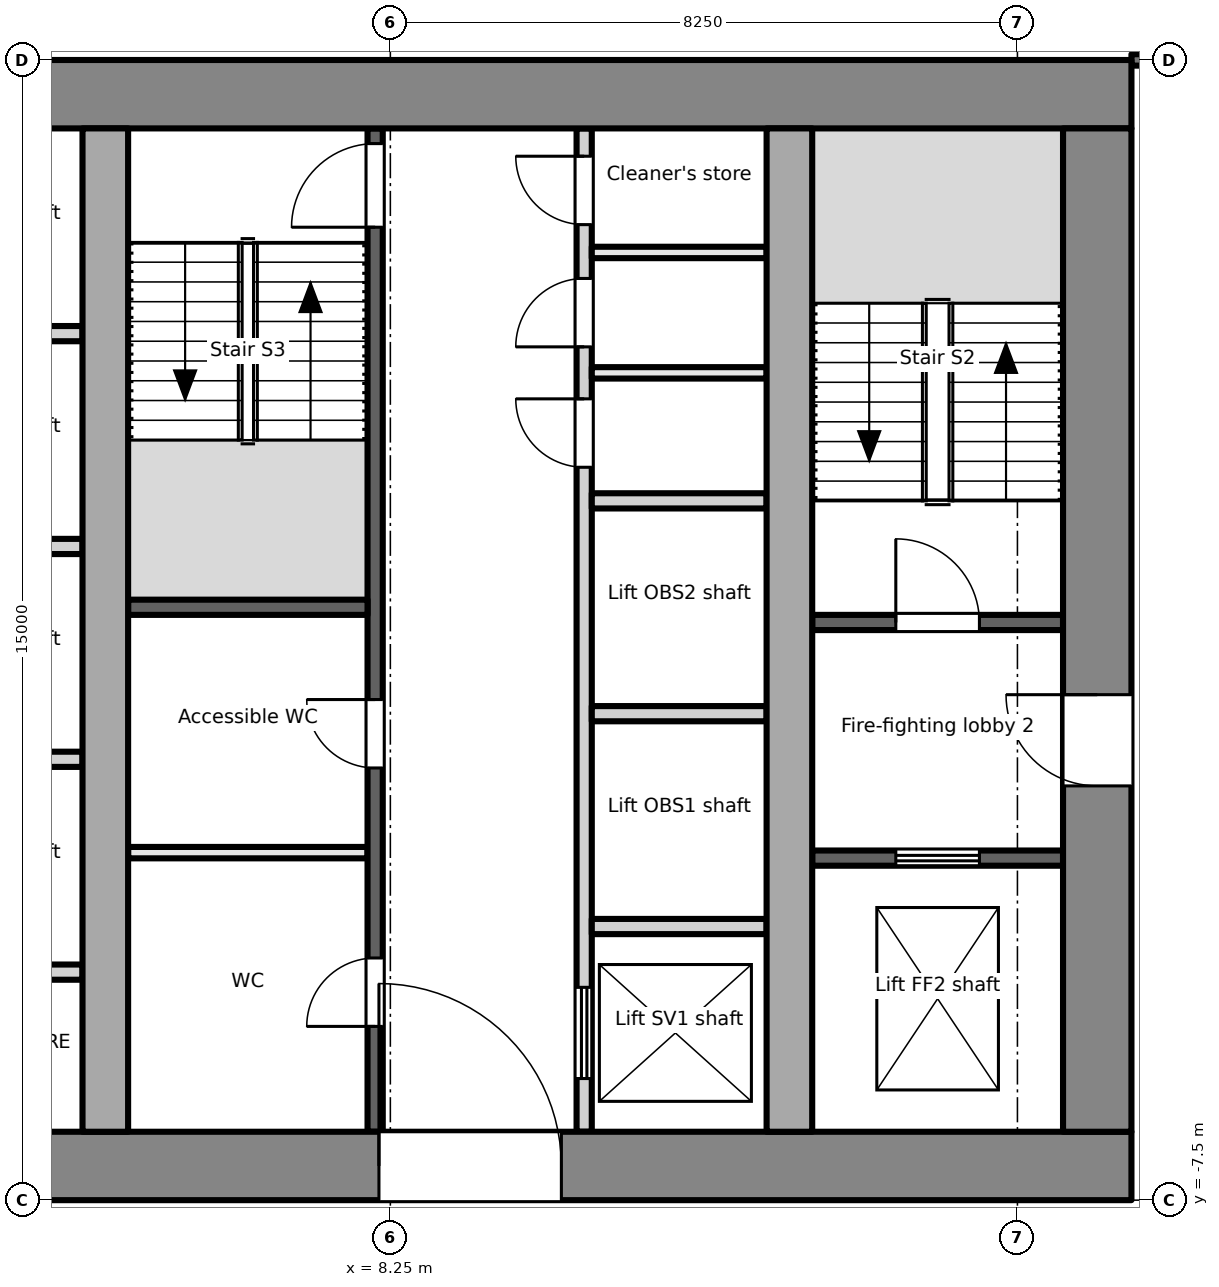
"""IFC4 building model, lengths in metres.
Left out: names, types, materials, properties, quantities, classifications, styles, units other than length and angle.
Written with IfcOpenShell. Run it as: python <this file> out.ifc"""

import sys

from ifc_helpers import new_model, si_unit, direction, frame, frame_2d, origin, place, context, subcontext, project, spatial, rectangle, extrude, element, fill, save


model = new_model("IFC4")
c1 = context("Model", 3, precision=1e-05, world=origin(), true_north=direction((0.0, 1.0)))
c2 = subcontext(c1, "Body", "Model", "MODEL_VIEW")
j1 = project(units=[si_unit("LENGTHUNIT", "METRE"), si_unit("PLANEANGLEUNIT", "RADIAN")], contexts=[c1])
p1 = place(None, origin())
s1 = spatial("IfcSite", under=j1, at=p1, CompositionType="ELEMENT")
p2 = place(p1, origin())
s2 = spatial("IfcBuilding", under=s1, at=p2, CompositionType="ELEMENT")
p3 = place(p2, frame((0.0, 0.0, 154.1)))
s3 = spatial("IfcBuildingStorey", under=s2, at=p3, CompositionType="ELEMENT", Elevation=154.1)
p4 = place(p3, frame((-18.0, -7.05, -0.2), z_axis=(0.0, 0.0, 1.0), x_axis=(1.0, 0.0, 0.0)))
e1 = element("IfcWall", 1, at=p4, inside=s3, PredefinedType="SHEAR", context=c2, shape_type="SweptSolid", body=[
    extrude(rectangle(XDim=36.0, YDim=0.9, at=frame_2d((18.0, 0.0))), origin(), (0.0, 0.0, 1.0), 4.0),
])
p5 = place(p4, frame((7.8, 0.0, 0.2)))
e2 = element("IfcOpeningElement", 2, at=p5, cuts=e1, PredefinedType="OPENING", context=c2, shape_type="SweptSolid", body=[
    extrude(rectangle(XDim=2.4, YDim=2.1, at=frame_2d((1.2, 1.05))), frame((0.0, 0.46, 0.0), z_axis=(0.0, -1.0, 0.0), x_axis=(1.0, 0.0, 0.0)), (0.0, 0.0, 1.0), 0.921),
])
p6 = place(p4, frame((17.4, 0.0, 0.2)))
e3 = element("IfcOpeningElement", 3, at=p6, cuts=e1, PredefinedType="OPENING", context=c2, shape_type="SweptSolid", body=[
    extrude(rectangle(XDim=1.2, YDim=2.1, at=frame_2d((0.6, 1.05))), frame((0.0, 0.46, 0.0), z_axis=(0.0, -1.0, 0.0), x_axis=(1.0, 0.0, 0.0)), (0.0, 0.0, 1.0), 0.921),
])
p7 = place(p4, frame((26.1, 0.0, 0.2)))
e4 = element("IfcOpeningElement", 4, at=p7, cuts=e1, PredefinedType="OPENING", context=c2, shape_type="SweptSolid", body=[
    extrude(rectangle(XDim=2.4, YDim=2.1, at=frame_2d((1.2, 1.05))), frame((0.0, 0.46, 0.0), z_axis=(0.0, -1.0, 0.0), x_axis=(1.0, 0.0, 0.0)), (0.0, 0.0, 1.0), 0.921),
])
p8 = place(p3, frame((-18.0, 7.05, -0.2), z_axis=(0.0, 0.0, 1.0), x_axis=(1.0, 0.0, 0.0)))
e5 = element("IfcWall", 5, at=p8, inside=s3, PredefinedType="SHEAR", context=c2, shape_type="SweptSolid", body=[
    extrude(rectangle(XDim=36.0, YDim=0.9, at=frame_2d((18.0, 0.0))), origin(), (0.0, 0.0, 1.0), 4.0),
])
p9 = place(p3, frame((17.55, -6.6, -0.2), z_axis=(0.0, 0.0, 1.0), x_axis=(0.0, 1.0, 0.0)))
e6 = element("IfcWall", 6, at=p9, inside=s3, PredefinedType="SHEAR", context=c2, shape_type="SweptSolid", body=[
    extrude(rectangle(XDim=13.2, YDim=0.9, at=frame_2d((6.6, 0.0))), origin(), (0.0, 0.0, 1.0), 4.0),
])
p10 = place(p9, frame((4.55, 0.0, 0.2)))
e7 = element("IfcOpeningElement", 7, at=p10, cuts=e6, PredefinedType="OPENING", context=c2, shape_type="SweptSolid", body=[
    extrude(rectangle(XDim=1.2, YDim=2.1, at=frame_2d((0.6, 1.05))), frame((0.0, 0.46, 0.0), z_axis=(0.0, -1.0, 0.0), x_axis=(1.0, 0.0, 0.0)), (0.0, 0.0, 1.0), 0.921),
])
for number, where, z_axis, x_axis in (
    (8, (4.5, -6.6, -0.2), (0.0, 0.0, 1.0), (0.0, 1.0, 0.0)),
    (9, (13.5, -6.6, -0.2), (0.0, 0.0, 1.0), (0.0, 1.0, 0.0)),
):
    element("IfcWall", number, at=place(p3, frame(where, z_axis=z_axis, x_axis=x_axis)), inside=s3, PredefinedType="SHEAR", context=c2, shape_type="SweptSolid", body=[
        extrude(rectangle(XDim=13.2, YDim=0.6, at=frame_2d((6.6, 0.0))), origin(), (0.0, 0.0, 1.0), 4.0),
    ])
p11 = place(p3, frame((13.8, -3.0, 0.0), z_axis=(0.0, 0.0, 1.0), x_axis=(1.0, 0.0, 0.0)))
e10 = element("IfcWall", 10, at=p11, inside=s3, PredefinedType="PARTITIONING", context=c2, shape_type="SweptSolid", body=[
    extrude(rectangle(XDim=3.3, YDim=0.2, at=frame_2d((1.65, 0.0))), origin(), (0.0, 0.0, 1.0), 3.8),
])
p12 = place(p11, frame((1.1, 0.0, 0.0)))
e11 = element("IfcOpeningElement", 11, at=p12, cuts=e10, PredefinedType="OPENING", context=c2, shape_type="SweptSolid", body=[
    extrude(rectangle(XDim=1.1, YDim=2.1, at=frame_2d((0.55, 1.05))), frame((0.0, 0.111, 0.0), z_axis=(0.0, -1.0, 0.0), x_axis=(1.0, 0.0, 0.0)), (0.0, 0.0, 1.0), 0.221),
])
p13 = place(p3, frame((13.8, 0.1, 0.0), z_axis=(0.0, 0.0, 1.0), x_axis=(1.0, 0.0, 0.0)))
e12 = element("IfcWall", 12, at=p13, inside=s3, PredefinedType="PARTITIONING", context=c2, shape_type="SweptSolid", body=[
    extrude(rectangle(XDim=3.3, YDim=0.2, at=frame_2d((1.65, 0.0))), origin(), (0.0, 0.0, 1.0), 3.8),
])
p14 = place(p13, frame((1.1, 0.0, 0.0)))
e13 = element("IfcOpeningElement", 13, at=p14, cuts=e12, PredefinedType="OPENING", context=c2, shape_type="SweptSolid", body=[
    extrude(rectangle(XDim=1.1, YDim=2.1, at=frame_2d((0.55, 1.05))), frame((0.0, 0.111, 0.0), z_axis=(0.0, -1.0, 0.0), x_axis=(1.0, 0.0, 0.0)), (0.0, 0.0, 1.0), 0.221),
])
for number, where, z_axis, x_axis in (
    (14, (1.9, -1.7, 0.0), (0.0, 0.0, 1.0), (1.0, 0.0, 0.0)),
    (15, (1.9, 1.1, 0.0), (0.0, 0.0, 1.0), (1.0, 0.0, 0.0)),
    (16, (1.9, 3.9, 0.0), (0.0, 0.0, 1.0), (1.0, 0.0, 0.0)),
    (17, (1.9, -4.5, 0.0), (0.0, 0.0, 1.0), (1.0, 0.0, 0.0)),
):
    element("IfcWall", number, at=place(p3, frame(where, z_axis=z_axis, x_axis=x_axis)), inside=s3, PredefinedType="PARTITIONING", context=c2, shape_type="SweptSolid", body=[
        extrude(rectangle(XDim=2.3, YDim=0.2, at=frame_2d((1.15, 0.0))), origin(), (0.0, 0.0, 1.0), 3.8),
    ])
p15 = place(p3, frame((8.05, -6.6, 0.0), z_axis=(0.0, 0.0, 1.0), x_axis=(0.0, 1.0, 0.0)))
e18 = element("IfcWall", 18, at=p15, inside=s3, PredefinedType="PARTITIONING", context=c2, shape_type="SweptSolid", body=[
    extrude(rectangle(XDim=13.2, YDim=0.2, at=frame_2d((6.6, 0.0))), origin(), (0.0, 0.0, 1.0), 3.8),
])
p16 = place(p15, frame((1.386, 0.0, 0.0)))
e19 = element("IfcOpeningElement", 19, at=p16, cuts=e18, PredefinedType="OPENING", context=c2, shape_type="SweptSolid", body=[
    extrude(rectangle(XDim=0.9, YDim=2.1, at=frame_2d((0.45, 1.05))), frame((0.0, 0.111, 0.0), z_axis=(0.0, -1.0, 0.0), x_axis=(1.0, 0.0, 0.0)), (0.0, 0.0, 1.0), 0.221),
])
p17 = place(p15, frame((4.786, 0.0, 0.0)))
e20 = element("IfcOpeningElement", 20, at=p17, cuts=e18, PredefinedType="OPENING", context=c2, shape_type="SweptSolid", body=[
    extrude(rectangle(XDim=0.9, YDim=2.1, at=frame_2d((0.45, 1.05))), frame((0.0, 0.111, 0.0), z_axis=(0.0, -1.0, 0.0), x_axis=(1.0, 0.0, 0.0)), (0.0, 0.0, 1.0), 0.221),
])
p18 = place(p15, frame((11.9, 0.0, 0.0)))
e21 = element("IfcOpeningElement", 21, at=p18, cuts=e18, PredefinedType="OPENING", context=c2, shape_type="SweptSolid", body=[
    extrude(rectangle(XDim=1.1, YDim=2.1, at=frame_2d((0.55, 1.05))), frame((0.0, 0.111, 0.0), z_axis=(0.0, -1.0, 0.0), x_axis=(1.0, 0.0, 0.0)), (0.0, 0.0, 1.0), 0.221),
])
p19 = place(p3, frame((10.8, -6.6, 0.0), z_axis=(0.0, 0.0, 1.0), x_axis=(0.0, 1.0, 0.0)))
e22 = element("IfcWall", 22, at=p19, inside=s3, PredefinedType="PARTITIONING", context=c2, shape_type="SweptSolid", body=[
    extrude(rectangle(XDim=13.2, YDim=0.2, at=frame_2d((6.6, 0.0))), origin(), (0.0, 0.0, 1.0), 3.8),
])
p20 = place(p19, frame((0.7, 0.0, 0.0)))
e23 = element("IfcOpeningElement", 23, at=p20, cuts=e22, PredefinedType="OPENING", context=c2, shape_type="SweptSolid", body=[
    extrude(rectangle(XDim=1.2, YDim=2.1, at=frame_2d((0.6, 1.05))), frame((0.0, 0.111, 0.0), z_axis=(0.0, -1.0, 0.0), x_axis=(1.0, 0.0, 0.0)), (0.0, 0.0, 1.0), 0.221),
])
p21 = place(p19, frame((8.742, 0.0, 0.0)))
e24 = element("IfcOpeningElement", 24, at=p21, cuts=e22, PredefinedType="OPENING", context=c2, shape_type="SweptSolid", body=[
    extrude(rectangle(XDim=0.9, YDim=2.1, at=frame_2d((0.45, 1.05))), frame((0.0, 0.111, 0.0), z_axis=(0.0, -1.0, 0.0), x_axis=(1.0, 0.0, 0.0)), (0.0, 0.0, 1.0), 0.221),
])
p22 = place(p19, frame((10.326, 0.0, 0.0)))
e25 = element("IfcOpeningElement", 25, at=p22, cuts=e22, PredefinedType="OPENING", context=c2, shape_type="SweptSolid", body=[
    extrude(rectangle(XDim=0.9, YDim=2.1, at=frame_2d((0.45, 1.05))), frame((0.0, 0.111, 0.0), z_axis=(0.0, -1.0, 0.0), x_axis=(1.0, 0.0, 0.0)), (0.0, 0.0, 1.0), 0.221),
])
p23 = place(p19, frame((11.934, 0.0, 0.0)))
e26 = element("IfcOpeningElement", 26, at=p23, cuts=e22, PredefinedType="OPENING", context=c2, shape_type="SweptSolid", body=[
    extrude(rectangle(XDim=0.9, YDim=2.1, at=frame_2d((0.45, 1.05))), frame((0.0, 0.111, 0.0), z_axis=(0.0, -1.0, 0.0), x_axis=(1.0, 0.0, 0.0)), (0.0, 0.0, 1.0), 0.221),
])
p24 = place(p3, frame((4.8, 0.3, 0.0), z_axis=(0.0, 0.0, 1.0), x_axis=(1.0, 0.0, 0.0)))
e27 = element("IfcWall", 27, at=p24, inside=s3, PredefinedType="PARTITIONING", context=c2, shape_type="SweptSolid", body=[
    extrude(rectangle(XDim=3.15, YDim=0.2, at=frame_2d((1.575, 0.0))), origin(), (0.0, 0.0, 1.0), 3.8),
])
p25 = place(p3, frame((4.8, -2.928, 0.0), z_axis=(0.0, 0.0, 1.0), x_axis=(1.0, 0.0, 0.0)))
e28 = element("IfcWall", 28, at=p25, inside=s3, PredefinedType="PARTITIONING", context=c2, shape_type="SweptSolid", body=[
    extrude(rectangle(XDim=3.15, YDim=0.15, at=frame_2d((1.575, 0.0))), origin(), (0.0, 0.0, 1.0), 3.8),
])
for number, where, z_axis, x_axis in (
    (29, (10.9, -3.9, 0.0), (0.0, 0.0, 1.0), (1.0, 0.0, 0.0)),
    (30, (10.9, -1.1, 0.0), (0.0, 0.0, 1.0), (1.0, 0.0, 0.0)),
    (31, (10.9, 1.7, 0.0), (0.0, 0.0, 1.0), (1.0, 0.0, 0.0)),
):
    element("IfcWall", number, at=place(p3, frame(where, z_axis=z_axis, x_axis=x_axis)), inside=s3, PredefinedType="PARTITIONING", context=c2, shape_type="SweptSolid", body=[
        extrude(rectangle(XDim=2.3, YDim=0.2, at=frame_2d((1.15, 0.0))), origin(), (0.0, 0.0, 1.0), 3.8),
    ])
for number, where, z_axis, x_axis in (
    (32, (10.9, 3.384, 0.0), (0.0, 0.0, 1.0), (1.0, 0.0, 0.0)),
    (33, (10.9, 4.968, 0.0), (0.0, 0.0, 1.0), (1.0, 0.0, 0.0)),
):
    element("IfcWall", number, at=place(p3, frame(where, z_axis=z_axis, x_axis=x_axis)), inside=s3, PredefinedType="PARTITIONING", context=c2, shape_type="SweptSolid", body=[
        extrude(rectangle(XDim=2.3, YDim=0.15, at=frame_2d((1.15, 0.0))), origin(), (0.0, 0.0, 1.0), 3.8),
    ])
p26 = place(p3, frame((18.0, 7.501, 0.0), z_axis=(0.0, 0.0, 1.0), x_axis=(1.0, 0.0, 0.0)))
e34 = element("IfcWall", 34, at=p26, inside=s3, PredefinedType="PARTITIONING", context=c2, shape_type="SweptSolid", body=[
    extrude(rectangle(XDim=2.325, YDim=0.15, at=frame_2d((1.163, 0.0))), origin(), (0.0, 0.0, 1.0), 3.8),
])
p27 = place(p12, origin())
e35 = element("IfcDoor", 35, at=p27, inside=s3, OperationType="DOUBLE_DOOR_SLIDING", PredefinedType="DOOR", context=c2, shape_type="SweptSolid", body=[
    extrude(rectangle(XDim=1.1, YDim=2.1, at=frame_2d((0.55, 1.05))), frame((0.0, 0.025, 0.0), z_axis=(0.0, -1.0, 0.0), x_axis=(1.0, 0.0, 0.0)), (0.0, 0.0, 1.0), 0.05),
])
fill(e11, e35)
p28 = place(p10, origin())
e36 = element("IfcDoor", 36, at=p28, inside=s3, OperationType="SINGLE_SWING_RIGHT", PredefinedType="DOOR", context=c2, shape_type="SweptSolid", body=[
    extrude(rectangle(XDim=1.2, YDim=2.1, at=frame_2d((0.6, 1.05))), frame((0.0, 0.025, 0.0), z_axis=(0.0, -1.0, 0.0), x_axis=(1.0, 0.0, 0.0)), (0.0, 0.0, 1.0), 0.05),
])
fill(e7, e36)
p29 = place(p14, origin())
e37 = element("IfcDoor", 37, at=p29, inside=s3, OperationType="SINGLE_SWING_LEFT", PredefinedType="DOOR", context=c2, shape_type="SweptSolid", body=[
    extrude(rectangle(XDim=1.1, YDim=2.1, at=frame_2d((0.55, 1.05))), frame((0.0, 0.025, 0.0), z_axis=(0.0, -1.0, 0.0), x_axis=(1.0, 0.0, 0.0)), (0.0, 0.0, 1.0), 0.05),
])
fill(e13, e37)
p30 = place(p16, origin())
e38 = element("IfcDoor", 38, at=p30, inside=s3, OperationType="SINGLE_SWING_LEFT", PredefinedType="DOOR", context=c2, shape_type="SweptSolid", body=[
    extrude(rectangle(XDim=0.9, YDim=2.1, at=frame_2d((0.45, 1.05))), frame((0.0, 0.025, 0.0), z_axis=(0.0, -1.0, 0.0), x_axis=(1.0, 0.0, 0.0)), (0.0, 0.0, 1.0), 0.05),
])
fill(e19, e38)
p31 = place(p17, origin())
e39 = element("IfcDoor", 39, at=p31, inside=s3, OperationType="SINGLE_SWING_RIGHT", PredefinedType="DOOR", context=c2, shape_type="SweptSolid", body=[
    extrude(rectangle(XDim=0.9, YDim=2.1, at=frame_2d((0.45, 1.05))), frame((0.0, 0.025, 0.0), z_axis=(0.0, -1.0, 0.0), x_axis=(1.0, 0.0, 0.0)), (0.0, 0.0, 1.0), 0.05),
])
fill(e20, e39)
p32 = place(p18, origin())
e40 = element("IfcDoor", 40, at=p32, inside=s3, OperationType="SINGLE_SWING_LEFT", PredefinedType="DOOR", context=c2, shape_type="SweptSolid", body=[
    extrude(rectangle(XDim=1.1, YDim=2.1, at=frame_2d((0.55, 1.05))), frame((0.0, 0.025, 0.0), z_axis=(0.0, -1.0, 0.0), x_axis=(1.0, 0.0, 0.0)), (0.0, 0.0, 1.0), 0.05),
])
fill(e21, e40)
p33 = place(p7, origin())
e41 = element("IfcDoor", 41, at=p33, inside=s3, OperationType="DOUBLE_DOOR_DOUBLE_SWING", PredefinedType="DOOR", context=c2, shape_type="SweptSolid", body=[
    extrude(rectangle(XDim=2.4, YDim=2.1, at=frame_2d((1.2, 1.05))), frame((0.0, 0.025, 0.0), z_axis=(0.0, -1.0, 0.0), x_axis=(1.0, 0.0, 0.0)), (0.0, 0.0, 1.0), 0.05),
])
fill(e4, e41)
p34 = place(p20, origin())
e42 = element("IfcDoor", 42, at=p34, inside=s3, OperationType="DOUBLE_DOOR_SLIDING", PredefinedType="DOOR", context=c2, shape_type="SweptSolid", body=[
    extrude(rectangle(XDim=1.2, YDim=2.1, at=frame_2d((0.6, 1.05))), frame((0.0, 0.025, 0.0), z_axis=(0.0, -1.0, 0.0), x_axis=(1.0, 0.0, 0.0)), (0.0, 0.0, 1.0), 0.05),
])
fill(e23, e42)
p35 = place(p21, origin())
e43 = element("IfcDoor", 43, at=p35, inside=s3, OperationType="SINGLE_SWING_RIGHT", PredefinedType="DOOR", context=c2, shape_type="SweptSolid", body=[
    extrude(rectangle(XDim=0.9, YDim=2.1, at=frame_2d((0.45, 1.05))), frame((0.0, 0.025, 0.0), z_axis=(0.0, -1.0, 0.0), x_axis=(1.0, 0.0, 0.0)), (0.0, 0.0, 1.0), 0.05),
])
fill(e24, e43)
p36 = place(p22, origin())
e44 = element("IfcDoor", 44, at=p36, inside=s3, OperationType="SINGLE_SWING_LEFT", PredefinedType="DOOR", context=c2, shape_type="SweptSolid", body=[
    extrude(rectangle(XDim=0.9, YDim=2.1, at=frame_2d((0.45, 1.05))), frame((0.0, 0.025, 0.0), z_axis=(0.0, -1.0, 0.0), x_axis=(1.0, 0.0, 0.0)), (0.0, 0.0, 1.0), 0.05),
])
fill(e25, e44)
p37 = place(p23, origin())
e45 = element("IfcDoor", 45, at=p37, inside=s3, OperationType="SINGLE_SWING_RIGHT", PredefinedType="DOOR", context=c2, shape_type="SweptSolid", body=[
    extrude(rectangle(XDim=0.9, YDim=2.1, at=frame_2d((0.45, 1.05))), frame((0.0, 0.025, 0.0), z_axis=(0.0, -1.0, 0.0), x_axis=(1.0, 0.0, 0.0)), (0.0, 0.0, 1.0), 0.05),
])
fill(e26, e45)
save(model, sys.argv[1])
